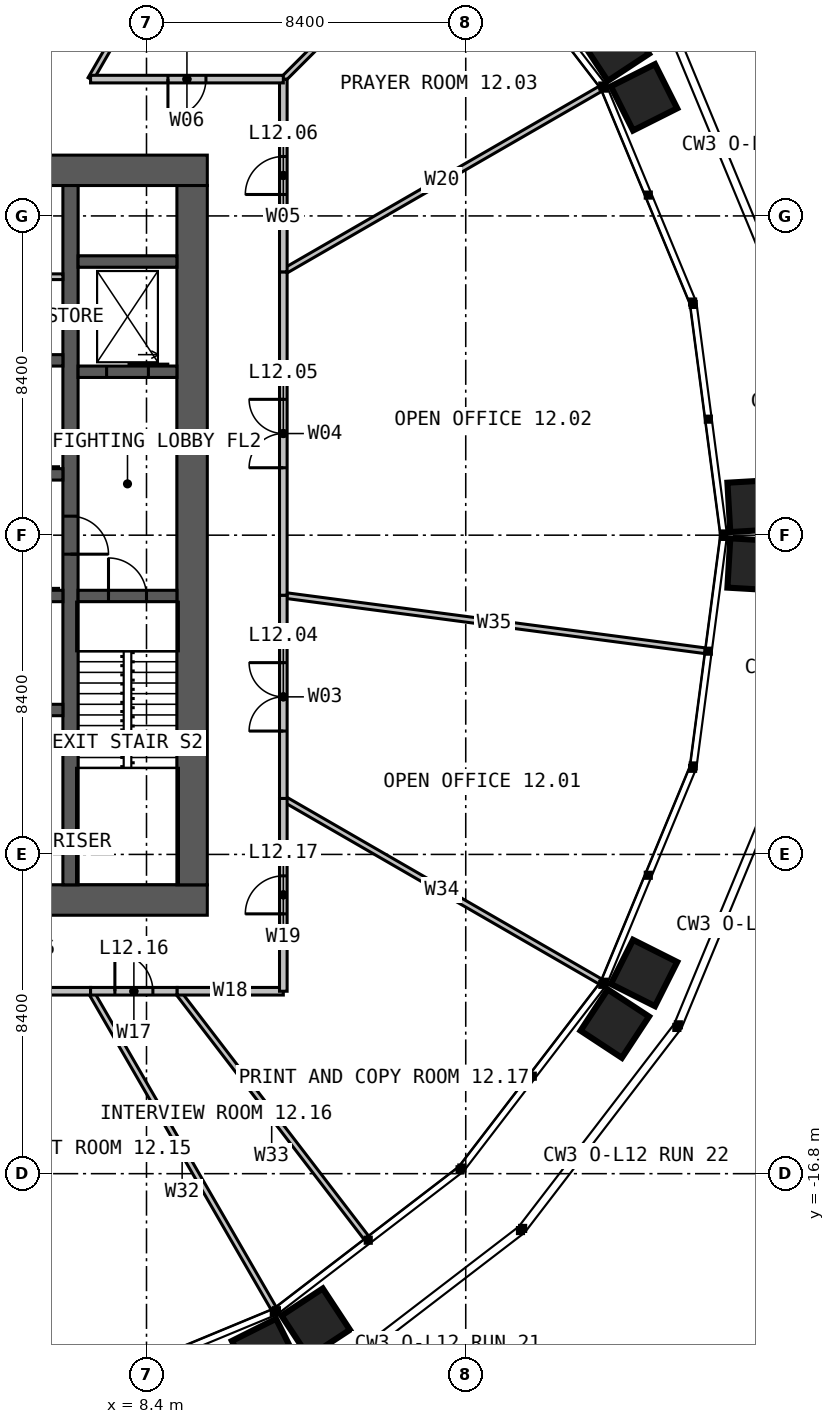
"""IFC4 building model, lengths in metres.
Left out: names, types, materials, properties, quantities, classifications, styles, units other than length and angle.
Written with IfcOpenShell. Run it as: python <this file> out.ifc"""

import sys

from ifc_helpers import new_model, si_unit, direction, frame, frame_2d, origin, place, context, subcontext, project, spatial, rectangle, extrude, element, fill, save


model = new_model("IFC4")
c1 = context("Model", 3, precision=1e-05, world=origin(), true_north=direction((0.0, 1.0)))
c2 = subcontext(c1, "Body", "Model", "MODEL_VIEW")
j1 = project(units=[si_unit("LENGTHUNIT", "METRE"), si_unit("PLANEANGLEUNIT", "RADIAN")], contexts=[c1])
p1 = place(None, origin())
s1 = spatial("IfcSite", under=j1, at=p1, CompositionType="ELEMENT")
p2 = place(p1, origin())
s2 = spatial("IfcBuilding", under=s1, at=p2, CompositionType="ELEMENT")
p3 = place(p2, frame((0.0, 0.0, 53.0)))
s3 = spatial("IfcBuildingStorey", under=s2, at=p3, CompositionType="ELEMENT", Elevation=53.0)
p4 = place(p3, frame((-10.0, 9.6, 0.0), z_axis=(0.0, 0.0, 1.0), x_axis=(1.0, 0.0, 0.0)))
e1 = element("IfcWall", 1, at=p4, inside=s3, PredefinedType="SOLIDWALL", context=c2, shape_type="SweptSolid", body=[
    extrude(rectangle(XDim=20.0, YDim=0.8, at=frame_2d((10.0, 0.0))), origin(), (0.0, 0.0, 1.0), 4.0),
])
p5 = place(p4, frame((9.4, 0.0, 0.0)))
e2 = element("IfcOpeningElement", 2, at=p5, cuts=e1, PredefinedType="OPENING", context=c2, shape_type="SweptSolid", body=[
    extrude(rectangle(XDim=1.2, YDim=2.2, at=frame_2d((0.6, 1.1))), frame((0.0, 0.41, 0.0), z_axis=(0.0, -1.0, 0.0), x_axis=(1.0, 0.0, 0.0)), (0.0, 0.0, 1.0), 0.82),
])
p6 = place(p3, frame((10.0, -9.6, 0.0), z_axis=(0.0, 0.0, 1.0), x_axis=(-1.0, 0.0, 0.0)))
e3 = element("IfcWall", 3, at=p6, inside=s3, PredefinedType="SOLIDWALL", context=c2, shape_type="SweptSolid", body=[
    extrude(rectangle(XDim=20.0, YDim=0.8, at=frame_2d((10.0, 0.0))), origin(), (0.0, 0.0, 1.0), 4.0),
])
p7 = place(p6, frame((6.875, 0.0, 0.0)))
e4 = element("IfcOpeningElement", 4, at=p7, cuts=e3, PredefinedType="OPENING", context=c2, shape_type="SweptSolid", body=[
    extrude(rectangle(XDim=1.2, YDim=2.2, at=frame_2d((0.6, 1.1))), frame((0.0, 0.41, 0.0), z_axis=(0.0, -1.0, 0.0), x_axis=(1.0, 0.0, 0.0)), (0.0, 0.0, 1.0), 0.82),
])
p8 = place(p3, frame((9.6, -9.2, 0.0), z_axis=(0.0, 0.0, 1.0), x_axis=(0.0, 1.0, 0.0)))
e5 = element("IfcWall", 5, at=p8, inside=s3, PredefinedType="SOLIDWALL", context=c2, shape_type="SweptSolid", body=[
    extrude(rectangle(XDim=18.4, YDim=0.8, at=frame_2d((9.2, 0.0))), origin(), (0.0, 0.0, 1.0), 4.0),
])
p9 = place(p3, frame((6.4, 9.2, 0.0), z_axis=(0.0, 0.0, 1.0), x_axis=(0.0, -1.0, 0.0)))
e6 = element("IfcWall", 6, at=p9, inside=s3, PredefinedType="SOLIDWALL", context=c2, shape_type="SweptSolid", body=[
    extrude(rectangle(XDim=18.4, YDim=0.4, at=frame_2d((9.2, 0.0))), origin(), (0.0, 0.0, 1.0), 4.0),
])
p10 = place(p9, frame((8.7, 0.0, 0.0)))
e7 = element("IfcOpeningElement", 7, at=p10, cuts=e6, PredefinedType="OPENING", context=c2, shape_type="SweptSolid", body=[
    extrude(rectangle(XDim=1.0, YDim=2.2, at=frame_2d((0.5, 1.1))), frame((0.0, 0.21, 0.0), z_axis=(0.0, -1.0, 0.0), x_axis=(1.0, 0.0, 0.0)), (0.0, 0.0, 1.0), 0.42),
])
p11 = place(p3, frame((1.35, 1.6, 0.0), z_axis=(0.0, 0.0, 1.0), x_axis=(1.0, 0.0, 0.0)))
e8 = element("IfcWall", 8, at=p11, inside=s3, PredefinedType="SOLIDWALL", context=c2, shape_type="SweptSolid", body=[
    extrude(rectangle(XDim=4.85, YDim=0.3, at=frame_2d((2.425, 0.0))), origin(), (0.0, 0.0, 1.0), 4.0),
])
p12 = place(p11, frame((0.6, 0.0, 0.0)))
e9 = element("IfcOpeningElement", 9, at=p12, cuts=e8, PredefinedType="OPENING", context=c2, shape_type="SweptSolid", body=[
    extrude(rectangle(XDim=1.1, YDim=2.2, at=frame_2d((0.55, 1.1))), frame((0.0, 0.16, 0.0), z_axis=(0.0, -1.0, 0.0), x_axis=(1.0, 0.0, 0.0)), (0.0, 0.0, 1.0), 0.32),
])
p13 = place(p11, frame((3.125, 0.0, 0.0)))
e10 = element("IfcOpeningElement", 10, at=p13, cuts=e8, PredefinedType="OPENING", context=c2, shape_type="SweptSolid", body=[
    extrude(rectangle(XDim=1.1, YDim=2.2, at=frame_2d((0.55, 1.1))), frame((0.0, 0.16, 0.0), z_axis=(0.0, -1.0, 0.0), x_axis=(1.0, 0.0, 0.0)), (0.0, 0.0, 1.0), 0.32),
])
p14 = place(p3, frame((1.35, 4.6, 0.0), z_axis=(0.0, 0.0, 1.0), x_axis=(1.0, 0.0, 0.0)))
e11 = element("IfcWall", 11, at=p14, inside=s3, PredefinedType="SOLIDWALL", context=c2, shape_type="SweptSolid", body=[
    extrude(rectangle(XDim=4.85, YDim=0.3, at=frame_2d((2.425, 0.0))), origin(), (0.0, 0.0, 1.0), 4.0),
])
p15 = place(p3, frame((3.85, -1.6, 0.0), z_axis=(0.0, 0.0, 1.0), x_axis=(1.0, 0.0, 0.0)))
e12 = element("IfcWall", 12, at=p15, inside=s3, PredefinedType="SOLIDWALL", context=c2, shape_type="SweptSolid", body=[
    extrude(rectangle(XDim=2.35, YDim=0.3, at=frame_2d((1.175, 0.0))), origin(), (0.0, 0.0, 1.0), 4.0),
])
p16 = place(p15, frame((0.625, 0.0, 0.0)))
e13 = element("IfcOpeningElement", 13, at=p16, cuts=e12, PredefinedType="OPENING", context=c2, shape_type="SweptSolid", body=[
    extrude(rectangle(XDim=1.1, YDim=2.2, at=frame_2d((0.55, 1.1))), frame((0.0, 0.16, 0.0), z_axis=(0.0, -1.0, 0.0), x_axis=(1.0, 0.0, 0.0)), (0.0, 0.0, 1.0), 0.32),
])
p17 = place(p3, frame((3.85, -4.6, 0.0), z_axis=(0.0, 0.0, 1.0), x_axis=(1.0, 0.0, 0.0)))
e14 = element("IfcWall", 14, at=p17, inside=s3, PredefinedType="SOLIDWALL", context=c2, shape_type="SweptSolid", body=[
    extrude(rectangle(XDim=2.35, YDim=0.3, at=frame_2d((1.175, 0.0))), origin(), (0.0, 0.0, 1.0), 4.0),
])
p18 = place(p3, frame((6.6, -1.6, 0.0), z_axis=(0.0, 0.0, 1.0), x_axis=(1.0, 0.0, 0.0)))
e15 = element("IfcWall", 15, at=p18, inside=s3, PredefinedType="SOLIDWALL", context=c2, shape_type="SweptSolid", body=[
    extrude(rectangle(XDim=2.6, YDim=0.3, at=frame_2d((1.3, 0.0))), origin(), (0.0, 0.0, 1.0), 4.0),
])
p19 = place(p18, frame((0.8, 0.0, 0.0)))
e16 = element("IfcOpeningElement", 16, at=p19, cuts=e15, PredefinedType="OPENING", context=c2, shape_type="SweptSolid", body=[
    extrude(rectangle(XDim=1.0, YDim=2.2, at=frame_2d((0.5, 1.1))), frame((0.0, 0.16, 0.0), z_axis=(0.0, -1.0, 0.0), x_axis=(1.0, 0.0, 0.0)), (0.0, 0.0, 1.0), 0.32),
])
p20 = place(p3, frame((6.6, 4.3, 0.0), z_axis=(0.0, 0.0, 1.0), x_axis=(1.0, 0.0, 0.0)))
e17 = element("IfcWall", 17, at=p20, inside=s3, PredefinedType="SOLIDWALL", context=c2, shape_type="SweptSolid", body=[
    extrude(rectangle(XDim=2.6, YDim=0.3, at=frame_2d((1.3, 0.0))), origin(), (0.0, 0.0, 1.0), 4.0),
])
p21 = place(p20, frame((0.75, 0.0, 0.0)))
e18 = element("IfcOpeningElement", 18, at=p21, cuts=e17, PredefinedType="OPENING", context=c2, shape_type="SweptSolid", body=[
    extrude(rectangle(XDim=1.1, YDim=2.2, at=frame_2d((0.55, 1.1))), frame((0.0, 0.16, 0.0), z_axis=(0.0, -1.0, 0.0), x_axis=(1.0, 0.0, 0.0)), (0.0, 0.0, 1.0), 0.32),
])
p22 = place(p3, frame((6.6, 7.2, 0.0), z_axis=(0.0, 0.0, 1.0), x_axis=(1.0, 0.0, 0.0)))
e19 = element("IfcWall", 19, at=p22, inside=s3, PredefinedType="SOLIDWALL", context=c2, shape_type="SweptSolid", body=[
    extrude(rectangle(XDim=2.6, YDim=0.3, at=frame_2d((1.3, 0.0))), origin(), (0.0, 0.0, 1.0), 4.0),
])
p23 = place(p3, frame((1.35, 6.8, 0.0), z_axis=(0.0, 0.0, 1.0), x_axis=(1.0, 0.0, 0.0)))
e20 = element("IfcWall", 20, at=p23, inside=s3, PredefinedType="PARTITIONING", context=c2, shape_type="SweptSolid", body=[
    extrude(rectangle(XDim=4.85, YDim=0.15, at=frame_2d((2.425, 0.0))), origin(), (0.0, 0.0, 1.0), 3.75),
])
p24 = place(p23, frame((3.15, 0.0, 0.0)))
e21 = element("IfcOpeningElement", 21, at=p24, cuts=e20, PredefinedType="OPENING", context=c2, shape_type="SweptSolid", body=[
    extrude(rectangle(XDim=0.9, YDim=2.2, at=frame_2d((0.45, 1.1))), frame((0.0, 0.085, 0.0), z_axis=(0.0, -1.0, 0.0), x_axis=(1.0, 0.0, 0.0)), (0.0, 0.0, 1.0), 0.17),
])
p25 = place(p3, frame((12.0, -6.928, 0.0), z_axis=(0.0, 0.0, 1.0), x_axis=(0.866030350715, -0.499991431567, 0.0)))
e22 = element("IfcWall", 22, at=p25, inside=s3, PredefinedType="PARTITIONING", context=c2, shape_type="SweptSolid", body=[
    extrude(rectangle(XDim=9.638, YDim=0.15, at=frame_2d((4.819, 0.0))), origin(), (0.0, 0.0, 1.0), 2.79),
])
p26 = place(p3, frame((12.0, -1.58, 0.0), z_axis=(0.0, 0.0, 1.0), x_axis=(0.991446050429, -0.130517160134, 0.0)))
e23 = element("IfcWall", 23, at=p26, inside=s3, PredefinedType="PARTITIONING", context=c2, shape_type="SweptSolid", body=[
    extrude(rectangle(XDim=11.19, YDim=0.15, at=frame_2d((5.595, 0.0))), origin(), (0.0, 0.0, 1.0), 2.79),
])
p27 = place(p3, frame((12.0, 6.928, 0.0), z_axis=(0.0, 0.0, 1.0), x_axis=(0.866030350715, 0.499991431567, 0.0)))
e24 = element("IfcWall", 24, at=p27, inside=s3, PredefinedType="PARTITIONING", context=c2, shape_type="SweptSolid", body=[
    extrude(rectangle(XDim=9.638, YDim=0.15, at=frame_2d((4.819, 0.0))), origin(), (0.0, 0.0, 1.0), 2.79),
])
p28 = place(p3, frame((12.0, 12.0, 0.0), z_axis=(0.0, 0.0, 1.0), x_axis=(0.707106781187, 0.707106781187, 0.0)))
e25 = element("IfcWall", 25, at=p28, inside=s3, PredefinedType="PARTITIONING", context=c2, shape_type="SweptSolid", body=[
    extrude(rectangle(XDim=6.524, YDim=0.15, at=frame_2d((3.262, 0.0))), origin(), (0.0, 0.0, 1.0), 2.79),
])
p29 = place(p3, frame((6.928, 12.0, 0.0), z_axis=(0.0, 0.0, 1.0), x_axis=(0.499991431567, 0.866030350715, 0.0)))
e26 = element("IfcWall", 26, at=p29, inside=s3, PredefinedType="PARTITIONING", context=c2, shape_type="SweptSolid", body=[
    extrude(rectangle(XDim=9.638, YDim=0.15, at=frame_2d((4.819, 0.0))), origin(), (0.0, 0.0, 1.0), 2.79),
])
p30 = place(p3, frame((3.215, -12.0, 0.0), z_axis=(0.0, 0.0, 1.0), x_axis=(0.258830514209, -0.965922753078, 0.0)))
e27 = element("IfcWall", 27, at=p30, inside=s3, PredefinedType="PARTITIONING", context=c2, shape_type="SweptSolid", body=[
    extrude(rectangle(XDim=11.071, YDim=0.15, at=frame_2d((5.535, 0.0))), origin(), (0.0, 0.0, 1.0), 2.79),
])
p31 = place(p3, frame((6.928, -12.0, 0.0), z_axis=(0.0, 0.0, 1.0), x_axis=(0.499991431567, -0.866030350715, 0.0)))
e28 = element("IfcWall", 28, at=p31, inside=s3, PredefinedType="PARTITIONING", context=c2, shape_type="SweptSolid", body=[
    extrude(rectangle(XDim=9.638, YDim=0.15, at=frame_2d((4.819, 0.0))), origin(), (0.0, 0.0, 1.0), 2.79),
])
p32 = place(p3, frame((9.208, -12.0, 0.0), z_axis=(0.0, 0.0, 1.0), x_axis=(0.608749658954, -0.793362371633, 0.0)))
e29 = element("IfcWall", 29, at=p32, inside=s3, PredefinedType="PARTITIONING", context=c2, shape_type="SweptSolid", body=[
    extrude(rectangle(XDim=8.167, YDim=0.15, at=frame_2d((4.084, 0.0))), origin(), (0.0, 0.0, 1.0), 2.79),
])
p33 = place(p3, frame((12.0, -6.928, 0.0), z_axis=(0.0, 0.0, 1.0), x_axis=(0.0, 1.0, 0.0)))
e30 = element("IfcWall", 30, at=p33, inside=s3, PredefinedType="PARTITIONING", context=c2, shape_type="SweptSolid", body=[
    extrude(rectangle(XDim=5.348, YDim=0.2, at=frame_2d((2.674, 0.0))), origin(), (0.0, 0.0, 1.0), 3.8),
])
p34 = place(p33, frame((1.774, 0.0, 0.0)))
e31 = element("IfcOpeningElement", 31, at=p34, cuts=e30, PredefinedType="OPENING", context=c2, shape_type="SweptSolid", body=[
    extrude(rectangle(XDim=1.8, YDim=2.2, at=frame_2d((0.9, 1.1))), frame((0.0, 0.11, 0.0), z_axis=(0.0, -1.0, 0.0), x_axis=(1.0, 0.0, 0.0)), (0.0, 0.0, 1.0), 0.22),
])
p35 = place(p3, frame((12.0, -1.58, 0.0), z_axis=(0.0, 0.0, 1.0), x_axis=(0.0, 1.0, 0.0)))
e32 = element("IfcWall", 32, at=p35, inside=s3, PredefinedType="PARTITIONING", context=c2, shape_type="SweptSolid", body=[
    extrude(rectangle(XDim=8.508, YDim=0.2, at=frame_2d((4.254, 0.0))), origin(), (0.0, 0.0, 1.0), 3.8),
])
p36 = place(p35, frame((3.354, 0.0, 0.0)))
e33 = element("IfcOpeningElement", 33, at=p36, cuts=e32, PredefinedType="OPENING", context=c2, shape_type="SweptSolid", body=[
    extrude(rectangle(XDim=1.8, YDim=2.2, at=frame_2d((0.9, 1.1))), frame((0.0, 0.11, 0.0), z_axis=(0.0, -1.0, 0.0), x_axis=(1.0, 0.0, 0.0)), (0.0, 0.0, 1.0), 0.22),
])
p37 = place(p3, frame((12.0, 6.928, 0.0), z_axis=(0.0, 0.0, 1.0), x_axis=(0.0, 1.0, 0.0)))
e34 = element("IfcWall", 34, at=p37, inside=s3, PredefinedType="PARTITIONING", context=c2, shape_type="SweptSolid", body=[
    extrude(rectangle(XDim=5.072, YDim=0.2, at=frame_2d((2.536, 0.0))), origin(), (0.0, 0.0, 1.0), 3.8),
])
p38 = place(p37, frame((2.036, 0.0, 0.0)))
e35 = element("IfcOpeningElement", 35, at=p38, cuts=e34, PredefinedType="OPENING", context=c2, shape_type="SweptSolid", body=[
    extrude(rectangle(XDim=1.0, YDim=2.2, at=frame_2d((0.5, 1.1))), frame((0.0, 0.11, 0.0), z_axis=(0.0, -1.0, 0.0), x_axis=(1.0, 0.0, 0.0)), (0.0, 0.0, 1.0), 0.22),
])
p39 = place(p3, frame((12.0, 12.0, 0.0), z_axis=(0.0, 0.0, 1.0), x_axis=(-1.0, 0.0, 0.0)))
e36 = element("IfcWall", 36, at=p39, inside=s3, PredefinedType="PARTITIONING", context=c2, shape_type="SweptSolid", body=[
    extrude(rectangle(XDim=5.072, YDim=0.2, at=frame_2d((2.536, 0.0))), origin(), (0.0, 0.0, 1.0), 3.8),
])
p40 = place(p39, frame((2.036, 0.0, 0.0)))
e37 = element("IfcOpeningElement", 37, at=p40, cuts=e36, PredefinedType="OPENING", context=c2, shape_type="SweptSolid", body=[
    extrude(rectangle(XDim=1.0, YDim=2.2, at=frame_2d((0.5, 1.1))), frame((0.0, 0.11, 0.0), z_axis=(0.0, -1.0, 0.0), x_axis=(1.0, 0.0, 0.0)), (0.0, 0.0, 1.0), 0.22),
])
p41 = place(p3, frame((3.215, -12.0, 0.0), z_axis=(0.0, 0.0, 1.0), x_axis=(1.0, 0.0, 0.0)))
e38 = element("IfcWall", 38, at=p41, inside=s3, PredefinedType="PARTITIONING", context=c2, shape_type="SweptSolid", body=[
    extrude(rectangle(XDim=3.713, YDim=0.2, at=frame_2d((1.856, 0.0))), origin(), (0.0, 0.0, 1.0), 3.8),
])
p42 = place(p41, frame((1.356, 0.0, 0.0)))
e39 = element("IfcOpeningElement", 39, at=p42, cuts=e38, PredefinedType="OPENING", context=c2, shape_type="SweptSolid", body=[
    extrude(rectangle(XDim=1.0, YDim=2.2, at=frame_2d((0.5, 1.1))), frame((0.0, 0.11, 0.0), z_axis=(0.0, -1.0, 0.0), x_axis=(1.0, 0.0, 0.0)), (0.0, 0.0, 1.0), 0.22),
])
p43 = place(p3, frame((6.928, -12.0, 0.0), z_axis=(0.0, 0.0, 1.0), x_axis=(1.0, 0.0, 0.0)))
e40 = element("IfcWall", 40, at=p43, inside=s3, PredefinedType="PARTITIONING", context=c2, shape_type="SweptSolid", body=[
    extrude(rectangle(XDim=2.28, YDim=0.2, at=frame_2d((1.14, 0.0))), origin(), (0.0, 0.0, 1.0), 3.8),
])
p44 = place(p43, frame((0.64, 0.0, 0.0)))
e41 = element("IfcOpeningElement", 41, at=p44, cuts=e40, PredefinedType="OPENING", context=c2, shape_type="SweptSolid", body=[
    extrude(rectangle(XDim=1.0, YDim=2.2, at=frame_2d((0.5, 1.1))), frame((0.0, 0.11, 0.0), z_axis=(0.0, -1.0, 0.0), x_axis=(1.0, 0.0, 0.0)), (0.0, 0.0, 1.0), 0.22),
])
p45 = place(p3, frame((9.208, -12.0, 0.0), z_axis=(0.0, 0.0, 1.0), x_axis=(1.0, 0.0, 0.0)))
e42 = element("IfcWall", 42, at=p45, inside=s3, PredefinedType="PARTITIONING", context=c2, shape_type="SweptSolid", body=[
    extrude(rectangle(XDim=2.792, YDim=0.2, at=frame_2d((1.396, 0.0))), origin(), (0.0, 0.0, 1.0), 3.8),
])
p46 = place(p3, frame((12.0, -12.0, 0.0), z_axis=(0.0, 0.0, 1.0), x_axis=(0.0, 1.0, 0.0)))
e43 = element("IfcWall", 43, at=p46, inside=s3, PredefinedType="PARTITIONING", context=c2, shape_type="SweptSolid", body=[
    extrude(rectangle(XDim=5.072, YDim=0.2, at=frame_2d((2.536, 0.0))), origin(), (0.0, 0.0, 1.0), 3.8),
])
p47 = place(p46, frame((2.036, 0.0, 0.0)))
e44 = element("IfcOpeningElement", 44, at=p47, cuts=e43, PredefinedType="OPENING", context=c2, shape_type="SweptSolid", body=[
    extrude(rectangle(XDim=1.0, YDim=2.2, at=frame_2d((0.5, 1.1))), frame((0.0, 0.11, 0.0), z_axis=(0.0, -1.0, 0.0), x_axis=(1.0, 0.0, 0.0)), (0.0, 0.0, 1.0), 0.22),
])
p48 = place(p10, origin())
e45 = element("IfcDoor", 45, at=p48, inside=s3, OperationType="SINGLE_SWING_RIGHT", PredefinedType="DOOR", context=c2, shape_type="SweptSolid", body=[
    extrude(rectangle(XDim=1.0, YDim=2.2, at=frame_2d((0.5, 1.1))), frame((0.0, 0.025, 0.0), z_axis=(0.0, -1.0, 0.0), x_axis=(1.0, 0.0, 0.0)), (0.0, 0.0, 1.0), 0.05),
])
fill(e7, e45)
p49 = place(p19, origin())
e46 = element("IfcDoor", 46, at=p49, inside=s3, OperationType="SINGLE_SWING_LEFT", PredefinedType="DOOR", context=c2, shape_type="SweptSolid", body=[
    extrude(rectangle(XDim=1.0, YDim=2.2, at=frame_2d((0.5, 1.1))), frame((0.0, 0.025, 0.0), z_axis=(0.0, -1.0, 0.0), x_axis=(1.0, 0.0, 0.0)), (0.0, 0.0, 1.0), 0.05),
])
fill(e16, e46)
p50 = place(p21, origin())
e47 = element("IfcDoor", 47, at=p50, inside=s3, OperationType="SLIDING_TO_LEFT", PredefinedType="DOOR", context=c2, shape_type="SweptSolid", body=[
    extrude(rectangle(XDim=1.1, YDim=2.2, at=frame_2d((0.55, 1.1))), frame((0.0, 0.025, 0.0), z_axis=(0.0, -1.0, 0.0), x_axis=(1.0, 0.0, 0.0)), (0.0, 0.0, 1.0), 0.05),
])
fill(e18, e47)
p51 = place(p34, origin())
e48 = element("IfcDoor", 48, at=p51, inside=s3, OperationType="DOUBLE_DOOR_SINGLE_SWING", PredefinedType="DOOR", context=c2, shape_type="SweptSolid", body=[
    extrude(rectangle(XDim=1.8, YDim=2.2, at=frame_2d((0.9, 1.1))), frame((0.0, 0.025, 0.0), z_axis=(0.0, -1.0, 0.0), x_axis=(1.0, 0.0, 0.0)), (0.0, 0.0, 1.0), 0.05),
])
fill(e31, e48)
p52 = place(p36, origin())
e49 = element("IfcDoor", 49, at=p52, inside=s3, OperationType="DOUBLE_DOOR_SINGLE_SWING", PredefinedType="DOOR", context=c2, shape_type="SweptSolid", body=[
    extrude(rectangle(XDim=1.8, YDim=2.2, at=frame_2d((0.9, 1.1))), frame((0.0, 0.025, 0.0), z_axis=(0.0, -1.0, 0.0), x_axis=(1.0, 0.0, 0.0)), (0.0, 0.0, 1.0), 0.05),
])
fill(e33, e49)
p53 = place(p38, origin())
e50 = element("IfcDoor", 50, at=p53, inside=s3, OperationType="SINGLE_SWING_LEFT", PredefinedType="DOOR", context=c2, shape_type="SweptSolid", body=[
    extrude(rectangle(XDim=1.0, YDim=2.2, at=frame_2d((0.5, 1.1))), frame((0.0, 0.025, 0.0), z_axis=(0.0, -1.0, 0.0), x_axis=(1.0, 0.0, 0.0)), (0.0, 0.0, 1.0), 0.05),
])
fill(e35, e50)
p54 = place(p40, origin())
e51 = element("IfcDoor", 51, at=p54, inside=s3, OperationType="SINGLE_SWING_RIGHT", PredefinedType="DOOR", context=c2, shape_type="SweptSolid", body=[
    extrude(rectangle(XDim=1.0, YDim=2.2, at=frame_2d((0.5, 1.1))), frame((0.0, 0.025, 0.0), z_axis=(0.0, -1.0, 0.0), x_axis=(1.0, 0.0, 0.0)), (0.0, 0.0, 1.0), 0.05),
])
fill(e37, e51)
p55 = place(p44, origin())
e52 = element("IfcDoor", 52, at=p55, inside=s3, OperationType="SINGLE_SWING_LEFT", PredefinedType="DOOR", context=c2, shape_type="SweptSolid", body=[
    extrude(rectangle(XDim=1.0, YDim=2.2, at=frame_2d((0.5, 1.1))), frame((0.0, 0.025, 0.0), z_axis=(0.0, -1.0, 0.0), x_axis=(1.0, 0.0, 0.0)), (0.0, 0.0, 1.0), 0.05),
])
fill(e41, e52)
p56 = place(p47, origin())
e53 = element("IfcDoor", 53, at=p56, inside=s3, OperationType="SINGLE_SWING_LEFT", PredefinedType="DOOR", context=c2, shape_type="SweptSolid", body=[
    extrude(rectangle(XDim=1.0, YDim=2.2, at=frame_2d((0.5, 1.1))), frame((0.0, 0.025, 0.0), z_axis=(0.0, -1.0, 0.0), x_axis=(1.0, 0.0, 0.0)), (0.0, 0.0, 1.0), 0.05),
])
fill(e44, e53)
save(model, sys.argv[1])
